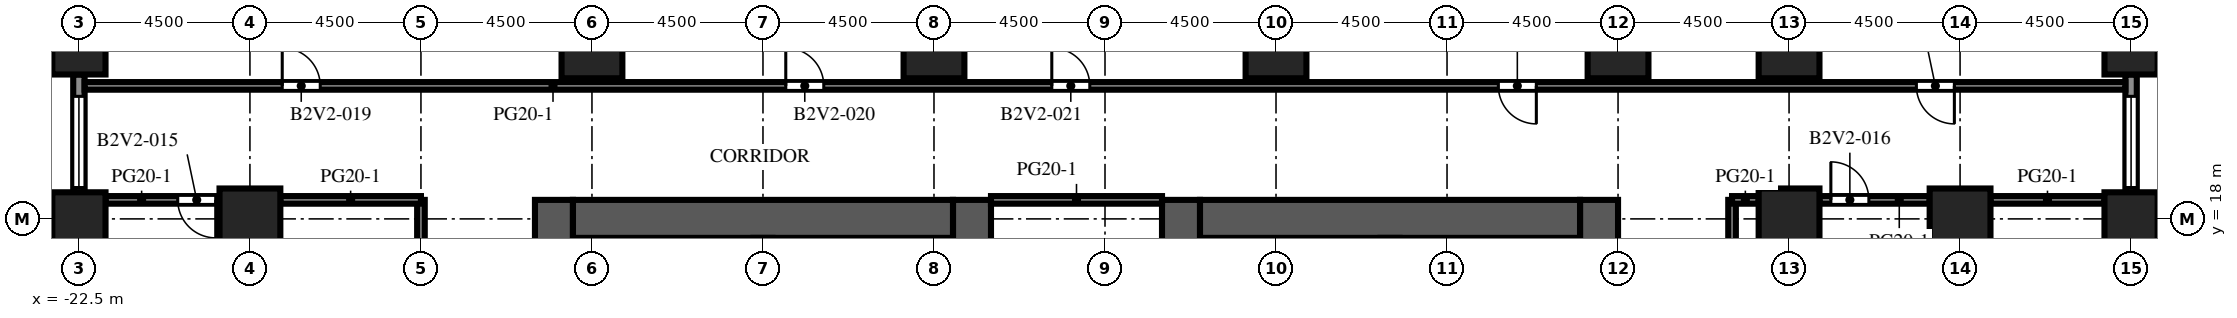
"""IFC4 building model, lengths in metres.
Left out: names, types, materials, properties, quantities, classifications, styles, units other than length and angle.
Written with IfcOpenShell. Run it as: python <this file> out.ifc"""

import sys

from ifc_helpers import new_model, si_unit, direction, frame, frame_2d, origin, origin_2d, place, context, subcontext, project, spatial, rectangle, extrude, element, fill, save


model = new_model("IFC4")
c1 = context("Model", 3, precision=1e-05, world=origin(), true_north=direction((0.0, 1.0)))
c2 = subcontext(c1, "Body", "Model", "MODEL_VIEW")
j1 = project(units=[si_unit("LENGTHUNIT", "METRE"), si_unit("PLANEANGLEUNIT", "RADIAN")], contexts=[c1])
p1 = place(None, origin())
s1 = spatial("IfcSite", under=j1, at=p1, CompositionType="ELEMENT")
p2 = place(p1, origin())
s2 = spatial("IfcBuilding", under=s1, at=p2, CompositionType="ELEMENT")
p3 = place(p2, frame((0.0, 0.0, 62.4)))
s3 = spatial("IfcBuildingStorey", under=s2, at=p3, CompositionType="ELEMENT", Elevation=62.4)
for number, where, z_axis, x_axis in (
    (1, (-22.5, 18.0, 0.0), (0.0, 0.0, 1.0), (1.0, 0.0, 0.0)),
    (2, (-22.5, 22.5, 0.0), (0.0, 0.0, 1.0), (1.0, 0.0, 0.0)),
    (3, (31.5, 18.0, 0.0), (0.0, 0.0, 1.0), (1.0, 0.0, 0.0)),
    (4, (31.5, 22.5, 0.0), (0.0, 0.0, 1.0), (1.0, 0.0, 0.0)),
):
    element("IfcColumn", number, at=place(p3, frame(where, z_axis=z_axis, x_axis=x_axis)), inside=s3, PredefinedType="COLUMN", context=c2, shape_type="SweptSolid", body=[
        extrude(rectangle(XDim=1.4, YDim=1.4, at=origin_2d()), origin(), (0.0, 0.0, 1.0), 4.1),
    ])
for number, where, z_axis, x_axis in (
    (5, (-18.0, 18.0, 0.0), (0.0, 0.0, 1.0), (1.0, 0.0, 0.0)),
    (6, (-9.0, 22.5, 0.0), (0.0, 0.0, 1.0), (1.0, 0.0, 0.0)),
    (7, (0.0, 22.5, 0.0), (0.0, 0.0, 1.0), (1.0, 0.0, 0.0)),
    (8, (9.0, 22.5, 0.0), (0.0, 0.0, 1.0), (1.0, 0.0, 0.0)),
    (9, (18.0, 22.5, 0.0), (0.0, 0.0, 1.0), (1.0, 0.0, 0.0)),
    (10, (22.5, 18.0, 0.0), (0.0, 0.0, 1.0), (1.0, 0.0, 0.0)),
    (11, (22.5, 22.5, 0.0), (0.0, 0.0, 1.0), (1.0, 0.0, 0.0)),
    (12, (27.0, 18.0, 0.0), (0.0, 0.0, 1.0), (1.0, 0.0, 0.0)),
):
    element("IfcColumn", number, at=place(p3, frame(where, z_axis=z_axis, x_axis=x_axis)), inside=s3, PredefinedType="COLUMN", context=c2, shape_type="SweptSolid", body=[
        extrude(rectangle(XDim=1.6, YDim=1.6, at=origin_2d()), origin(), (0.0, 0.0, 1.0), 4.1),
    ])
p4 = place(p3, frame((-10.0, -9.0, 0.0), z_axis=(0.0, 0.0, 1.0), x_axis=(0.0, 1.0, 0.0)))
e13 = element("IfcWall", 13, at=p4, inside=s3, PredefinedType="SHEAR", context=c2, shape_type="SweptSolid", body=[
    extrude(rectangle(XDim=27.5, YDim=1.0, at=frame_2d((13.75, 0.0))), origin(), (0.0, 0.0, 1.0), 4.1),
])
p5 = place(p4, frame((12.55, 0.0, 0.0)))
e14 = element("IfcOpeningElement", 14, at=p5, cuts=e13, PredefinedType="OPENING", context=c2, shape_type="SweptSolid", body=[
    extrude(rectangle(XDim=2.4, YDim=2.4, at=frame_2d((1.2, 1.2))), frame((0.0, 0.51, 0.0), z_axis=(0.0, -1.0, 0.0), x_axis=(1.0, 0.0, 0.0)), (0.0, 0.0, 1.0), 1.02),
])
p6 = place(p4, frame((6.825, 0.0, 0.0)))
e15 = element("IfcOpeningElement", 15, at=p6, cuts=e13, PredefinedType="OPENING", context=c2, shape_type="SweptSolid", body=[
    extrude(rectangle(XDim=1.2, YDim=2.1, at=frame_2d((0.6, 1.05))), frame((0.0, 0.51, 0.0), z_axis=(0.0, -1.0, 0.0), x_axis=(1.0, 0.0, 0.0)), (0.0, 0.0, 1.0), 1.02),
])
p7 = place(p4, frame((19.475, 0.0, 0.0)))
e16 = element("IfcOpeningElement", 16, at=p7, cuts=e13, PredefinedType="OPENING", context=c2, shape_type="SweptSolid", body=[
    extrude(rectangle(XDim=1.2, YDim=2.1, at=frame_2d((0.6, 1.05))), frame((0.0, 0.51, 0.0), z_axis=(0.0, -1.0, 0.0), x_axis=(1.0, 0.0, 0.0)), (0.0, 0.0, 1.0), 1.02),
])
p8 = place(p3, frame((1.0, -9.0, 0.0), z_axis=(0.0, 0.0, 1.0), x_axis=(0.0, 1.0, 0.0)))
e17 = element("IfcWall", 17, at=p8, inside=s3, PredefinedType="SHEAR", context=c2, shape_type="SweptSolid", body=[
    extrude(rectangle(XDim=27.5, YDim=1.0, at=frame_2d((13.75, 0.0))), origin(), (0.0, 0.0, 1.0), 4.1),
])
p9 = place(p8, frame((12.55, 0.0, 0.0)))
e18 = element("IfcOpeningElement", 18, at=p9, cuts=e17, PredefinedType="OPENING", context=c2, shape_type="SweptSolid", body=[
    extrude(rectangle(XDim=2.4, YDim=2.4, at=frame_2d((1.2, 1.2))), frame((0.0, 0.51, 0.0), z_axis=(0.0, -1.0, 0.0), x_axis=(1.0, 0.0, 0.0)), (0.0, 0.0, 1.0), 1.02),
])
p10 = place(p8, frame((5.55, 0.0, 0.0)))
e19 = element("IfcOpeningElement", 19, at=p10, cuts=e17, PredefinedType="OPENING", context=c2, shape_type="SweptSolid", body=[
    extrude(rectangle(XDim=0.905, YDim=2.1, at=frame_2d((0.453, 1.05))), frame((0.0, 0.51, 0.0), z_axis=(0.0, -1.0, 0.0), x_axis=(1.0, 0.0, 0.0)), (0.0, 0.0, 1.0), 1.02),
])
p11 = place(p8, frame((23.363, 0.0, 0.0)))
e20 = element("IfcOpeningElement", 20, at=p11, cuts=e17, PredefinedType="OPENING", context=c2, shape_type="SweptSolid", body=[
    extrude(rectangle(XDim=1.2, YDim=2.1, at=frame_2d((0.6, 1.05))), frame((0.0, 0.51, 0.0), z_axis=(0.0, -1.0, 0.0), x_axis=(1.0, 0.0, 0.0)), (0.0, 0.0, 1.0), 1.02),
])
p12 = place(p3, frame((-9.5, 18.0, 0.0), z_axis=(0.0, 0.0, 1.0), x_axis=(1.0, 0.0, 0.0)))
e21 = element("IfcWall", 21, at=p12, inside=s3, PredefinedType="SHEAR", context=c2, shape_type="SweptSolid", body=[
    extrude(rectangle(XDim=10.0, YDim=1.0, at=frame_2d((5.0, 0.0))), origin(), (0.0, 0.0, 1.0), 4.1),
])
p13 = place(p3, frame((6.5, -9.0, 0.0), z_axis=(0.0, 0.0, 1.0), x_axis=(0.0, 1.0, 0.0)))
e22 = element("IfcWall", 22, at=p13, inside=s3, PredefinedType="SHEAR", context=c2, shape_type="SweptSolid", body=[
    extrude(rectangle(XDim=27.5, YDim=1.0, at=frame_2d((13.75, 0.0))), origin(), (0.0, 0.0, 1.0), 4.1),
])
p14 = place(p13, frame((12.55, 0.0, 0.0)))
e23 = element("IfcOpeningElement", 23, at=p14, cuts=e22, PredefinedType="OPENING", context=c2, shape_type="SweptSolid", body=[
    extrude(rectangle(XDim=2.4, YDim=2.4, at=frame_2d((1.2, 1.2))), frame((0.0, 0.51, 0.0), z_axis=(0.0, -1.0, 0.0), x_axis=(1.0, 0.0, 0.0)), (0.0, 0.0, 1.0), 1.02),
])
p15 = place(p13, frame((5.55, 0.0, 0.0)))
e24 = element("IfcOpeningElement", 24, at=p15, cuts=e22, PredefinedType="OPENING", context=c2, shape_type="SweptSolid", body=[
    extrude(rectangle(XDim=0.905, YDim=2.1, at=frame_2d((0.453, 1.05))), frame((0.0, 0.51, 0.0), z_axis=(0.0, -1.0, 0.0), x_axis=(1.0, 0.0, 0.0)), (0.0, 0.0, 1.0), 1.02),
])
p16 = place(p13, frame((23.363, 0.0, 0.0)))
e25 = element("IfcOpeningElement", 25, at=p16, cuts=e22, PredefinedType="OPENING", context=c2, shape_type="SweptSolid", body=[
    extrude(rectangle(XDim=1.2, YDim=2.1, at=frame_2d((0.6, 1.05))), frame((0.0, 0.51, 0.0), z_axis=(0.0, -1.0, 0.0), x_axis=(1.0, 0.0, 0.0)), (0.0, 0.0, 1.0), 1.02),
])
p17 = place(p3, frame((17.5, -9.0, 0.0), z_axis=(0.0, 0.0, 1.0), x_axis=(0.0, 1.0, 0.0)))
e26 = element("IfcWall", 26, at=p17, inside=s3, PredefinedType="SHEAR", context=c2, shape_type="SweptSolid", body=[
    extrude(rectangle(XDim=27.5, YDim=1.0, at=frame_2d((13.75, 0.0))), origin(), (0.0, 0.0, 1.0), 4.1),
])
p18 = place(p17, frame((12.55, 0.0, 0.0)))
e27 = element("IfcOpeningElement", 27, at=p18, cuts=e26, PredefinedType="OPENING", context=c2, shape_type="SweptSolid", body=[
    extrude(rectangle(XDim=2.4, YDim=2.4, at=frame_2d((1.2, 1.2))), frame((0.0, 0.51, 0.0), z_axis=(0.0, -1.0, 0.0), x_axis=(1.0, 0.0, 0.0)), (0.0, 0.0, 1.0), 1.02),
])
p19 = place(p17, frame((6.825, 0.0, 0.0)))
e28 = element("IfcOpeningElement", 28, at=p19, cuts=e26, PredefinedType="OPENING", context=c2, shape_type="SweptSolid", body=[
    extrude(rectangle(XDim=1.2, YDim=2.1, at=frame_2d((0.6, 1.05))), frame((0.0, 0.51, 0.0), z_axis=(0.0, -1.0, 0.0), x_axis=(1.0, 0.0, 0.0)), (0.0, 0.0, 1.0), 1.02),
])
p20 = place(p17, frame((19.475, 0.0, 0.0)))
e29 = element("IfcOpeningElement", 29, at=p20, cuts=e26, PredefinedType="OPENING", context=c2, shape_type="SweptSolid", body=[
    extrude(rectangle(XDim=1.2, YDim=2.1, at=frame_2d((0.6, 1.05))), frame((0.0, 0.51, 0.0), z_axis=(0.0, -1.0, 0.0), x_axis=(1.0, 0.0, 0.0)), (0.0, 0.0, 1.0), 1.02),
])
p21 = place(p3, frame((7.0, 18.0, 0.0), z_axis=(0.0, 0.0, 1.0), x_axis=(1.0, 0.0, 0.0)))
e30 = element("IfcWall", 30, at=p21, inside=s3, PredefinedType="SHEAR", context=c2, shape_type="SweptSolid", body=[
    extrude(rectangle(XDim=10.0, YDim=1.0, at=frame_2d((5.0, 0.0))), origin(), (0.0, 0.0, 1.0), 4.1),
])
p22 = place(p3, frame((31.5, 21.8, 0.0), z_axis=(0.0, 0.0, 1.0), x_axis=(0.0, -1.0, 0.0)))
e31 = element("IfcWall", 31, at=p22, inside=s3, PredefinedType="SOLIDWALL", context=c2, shape_type="SweptSolid", body=[
    extrude(rectangle(XDim=3.1, YDim=0.3, at=frame_2d((1.55, 0.0))), origin(), (0.0, 0.0, 1.0), 2.75),
])
p23 = place(p22, frame((0.575, 0.0, 0.8)))
e32 = element("IfcOpeningElement", 32, at=p23, cuts=e31, PredefinedType="OPENING", context=c2, shape_type="SweptSolid", body=[
    extrude(rectangle(XDim=2.4, YDim=1.7, at=frame_2d((1.2, 0.85))), frame((0.0, 0.16, 0.0), z_axis=(0.0, -1.0, 0.0), x_axis=(1.0, 0.0, 0.0)), (0.0, 0.0, 1.0), 0.32),
])
p24 = place(p3, frame((-22.5, 18.7, 0.0), z_axis=(0.0, 0.0, 1.0), x_axis=(0.0, 1.0, 0.0)))
e33 = element("IfcWall", 33, at=p24, inside=s3, PredefinedType="SOLIDWALL", context=c2, shape_type="SweptSolid", body=[
    extrude(rectangle(XDim=3.1, YDim=0.3, at=frame_2d((1.55, 0.0))), origin(), (0.0, 0.0, 1.0), 2.75),
])
p25 = place(p24, frame((0.125, 0.0, 0.8)))
e34 = element("IfcOpeningElement", 34, at=p25, cuts=e33, PredefinedType="OPENING", context=c2, shape_type="SweptSolid", body=[
    extrude(rectangle(XDim=2.4, YDim=1.7, at=frame_2d((1.2, 0.85))), frame((0.0, 0.16, 0.0), z_axis=(0.0, -1.0, 0.0), x_axis=(1.0, 0.0, 0.0)), (0.0, 0.0, 1.0), 0.32),
])
p26 = place(p3, frame((-13.5, -9.0, 0.0), z_axis=(0.0, 0.0, 1.0), x_axis=(0.0, 1.0, 0.0)))
e35 = element("IfcWall", 35, at=p26, inside=s3, PredefinedType="PARTITIONING", context=c2, shape_type="SweptSolid", body=[
    extrude(rectangle(XDim=27.5, YDim=0.2, at=frame_2d((13.75, 0.0))), origin(), (0.0, 0.0, 1.0), 3.65),
])
p27 = place(p26, frame((4.85, 0.0, 0.0)))
e36 = element("IfcOpeningElement", 36, at=p27, cuts=e35, PredefinedType="OPENING", context=c2, shape_type="SweptSolid", body=[
    extrude(rectangle(XDim=1.0, YDim=2.1, at=frame_2d((0.5, 1.05))), frame((0.0, 0.11, 0.0), z_axis=(0.0, -1.0, 0.0), x_axis=(1.0, 0.0, 0.0)), (0.0, 0.0, 1.0), 0.22),
])
p28 = place(p26, frame((16.35, 0.0, 0.0)))
e37 = element("IfcOpeningElement", 37, at=p28, cuts=e35, PredefinedType="OPENING", context=c2, shape_type="SweptSolid", body=[
    extrude(rectangle(XDim=1.0, YDim=2.1, at=frame_2d((0.5, 1.05))), frame((0.0, 0.11, 0.0), z_axis=(0.0, -1.0, 0.0), x_axis=(1.0, 0.0, 0.0)), (0.0, 0.0, 1.0), 0.22),
])
p29 = place(p3, frame((21.0, 18.5, 0.0), z_axis=(0.0, 0.0, 1.0), x_axis=(0.0, -1.0, 0.0)))
e38 = element("IfcWall", 38, at=p29, inside=s3, PredefinedType="PARTITIONING", context=c2, shape_type="SweptSolid", body=[
    extrude(rectangle(XDim=27.5, YDim=0.2, at=frame_2d((13.75, 0.0))), origin(), (0.0, 0.0, 1.0), 3.65),
])
p30 = place(p29, frame((19.4, 0.0, 0.0)))
e39 = element("IfcOpeningElement", 39, at=p30, cuts=e38, PredefinedType="OPENING", context=c2, shape_type="SweptSolid", body=[
    extrude(rectangle(XDim=1.0, YDim=2.1, at=frame_2d((0.5, 1.05))), frame((0.0, 0.11, 0.0), z_axis=(0.0, -1.0, 0.0), x_axis=(1.0, 0.0, 0.0)), (0.0, 0.0, 1.0), 0.22),
])
p31 = place(p29, frame((7.65, 0.0, 0.0)))
e40 = element("IfcOpeningElement", 40, at=p31, cuts=e38, PredefinedType="OPENING", context=c2, shape_type="SweptSolid", body=[
    extrude(rectangle(XDim=1.0, YDim=2.1, at=frame_2d((0.5, 1.05))), frame((0.0, 0.11, 0.0), z_axis=(0.0, -1.0, 0.0), x_axis=(1.0, 0.0, 0.0)), (0.0, 0.0, 1.0), 0.22),
])
p32 = place(p3, frame((-18.8, 18.5, 0.0), z_axis=(0.0, 0.0, 1.0), x_axis=(-1.0, 0.0, 0.0)))
e41 = element("IfcWall", 41, at=p32, inside=s3, PredefinedType="PARTITIONING", context=c2, shape_type="SweptSolid", body=[
    extrude(rectangle(XDim=3.0, YDim=0.2, at=frame_2d((1.5, 0.0))), origin(), (0.0, 0.0, 1.0), 3.65),
])
p33 = place(p32, frame((0.1, 0.0, 0.0)))
e42 = element("IfcOpeningElement", 42, at=p33, cuts=e41, PredefinedType="OPENING", context=c2, shape_type="SweptSolid", body=[
    extrude(rectangle(XDim=1.0, YDim=2.1, at=frame_2d((0.5, 1.05))), frame((0.0, 0.11, 0.0), z_axis=(0.0, -1.0, 0.0), x_axis=(1.0, 0.0, 0.0)), (0.0, 0.0, 1.0), 0.22),
])
p34 = place(p3, frame((-17.2, 18.5, 0.0), z_axis=(0.0, 0.0, 1.0), x_axis=(1.0, 0.0, 0.0)))
e43 = element("IfcWall", 43, at=p34, inside=s3, PredefinedType="PARTITIONING", context=c2, shape_type="SweptSolid", body=[
    extrude(rectangle(XDim=3.7, YDim=0.2, at=frame_2d((1.85, 0.0))), origin(), (0.0, 0.0, 1.0), 3.65),
])
p35 = place(p3, frame((1.5, 18.5, 0.0), z_axis=(0.0, 0.0, 1.0), x_axis=(1.0, 0.0, 0.0)))
e44 = element("IfcWall", 44, at=p35, inside=s3, PredefinedType="PARTITIONING", context=c2, shape_type="SweptSolid", body=[
    extrude(rectangle(XDim=4.5, YDim=0.2, at=frame_2d((2.25, 0.0))), origin(), (0.0, 0.0, 1.0), 3.65),
])
p36 = place(p3, frame((21.0, 18.5, 0.0), z_axis=(0.0, 0.0, 1.0), x_axis=(1.0, 0.0, 0.0)))
e45 = element("IfcWall", 45, at=p36, inside=s3, PredefinedType="PARTITIONING", context=c2, shape_type="SweptSolid", body=[
    extrude(rectangle(XDim=0.7, YDim=0.2, at=frame_2d((0.35, 0.0))), origin(), (0.0, 0.0, 1.0), 3.65),
])
p37 = place(p3, frame((26.2, 18.5, 0.0), z_axis=(0.0, 0.0, 1.0), x_axis=(-1.0, 0.0, 0.0)))
e46 = element("IfcWall", 46, at=p37, inside=s3, PredefinedType="PARTITIONING", context=c2, shape_type="SweptSolid", body=[
    extrude(rectangle(XDim=2.9, YDim=0.2, at=frame_2d((1.45, 0.0))), origin(), (0.0, 0.0, 1.0), 3.65),
])
p38 = place(p37, frame((1.6, 0.0, 0.0)))
e47 = element("IfcOpeningElement", 47, at=p38, cuts=e46, PredefinedType="OPENING", context=c2, shape_type="SweptSolid", body=[
    extrude(rectangle(XDim=1.0, YDim=2.1, at=frame_2d((0.5, 1.05))), frame((0.0, 0.11, 0.0), z_axis=(0.0, -1.0, 0.0), x_axis=(1.0, 0.0, 0.0)), (0.0, 0.0, 1.0), 0.22),
])
p39 = place(p3, frame((27.8, 18.5, 0.0), z_axis=(0.0, 0.0, 1.0), x_axis=(1.0, 0.0, 0.0)))
e48 = element("IfcWall", 48, at=p39, inside=s3, PredefinedType="PARTITIONING", context=c2, shape_type="SweptSolid", body=[
    extrude(rectangle(XDim=3.0, YDim=0.2, at=frame_2d((1.5, 0.0))), origin(), (0.0, 0.0, 1.0), 3.65),
])
p40 = place(p3, frame((-22.35, 21.5, 0.0), z_axis=(0.0, 0.0, 1.0), x_axis=(1.0, 0.0, 0.0)))
e49 = element("IfcWall", 49, at=p40, inside=s3, PredefinedType="PARTITIONING", context=c2, shape_type="SweptSolid", body=[
    extrude(rectangle(XDim=53.7, YDim=0.2, at=frame_2d((26.85, 0.0))), origin(), (0.0, 0.0, 1.0), 3.65),
])
p41 = place(p40, frame((5.2, 0.0, 0.0)))
e50 = element("IfcOpeningElement", 50, at=p41, cuts=e49, PredefinedType="OPENING", context=c2, shape_type="SweptSolid", body=[
    extrude(rectangle(XDim=1.0, YDim=2.1, at=frame_2d((0.5, 1.05))), frame((0.0, 0.11, 0.0), z_axis=(0.0, -1.0, 0.0), x_axis=(1.0, 0.0, 0.0)), (0.0, 0.0, 1.0), 0.22),
])
p42 = place(p40, frame((18.45, 0.0, 0.0)))
e51 = element("IfcOpeningElement", 51, at=p42, cuts=e49, PredefinedType="OPENING", context=c2, shape_type="SweptSolid", body=[
    extrude(rectangle(XDim=1.0, YDim=2.1, at=frame_2d((0.5, 1.05))), frame((0.0, 0.11, 0.0), z_axis=(0.0, -1.0, 0.0), x_axis=(1.0, 0.0, 0.0)), (0.0, 0.0, 1.0), 0.22),
])
p43 = place(p40, frame((25.45, 0.0, 0.0)))
e52 = element("IfcOpeningElement", 52, at=p43, cuts=e49, PredefinedType="OPENING", context=c2, shape_type="SweptSolid", body=[
    extrude(rectangle(XDim=1.0, YDim=2.1, at=frame_2d((0.5, 1.05))), frame((0.0, 0.11, 0.0), z_axis=(0.0, -1.0, 0.0), x_axis=(1.0, 0.0, 0.0)), (0.0, 0.0, 1.0), 0.22),
])
p44 = place(p40, frame((37.2, 0.0, 0.0)))
e53 = element("IfcOpeningElement", 53, at=p44, cuts=e49, PredefinedType="OPENING", context=c2, shape_type="SweptSolid", body=[
    extrude(rectangle(XDim=1.0, YDim=2.1, at=frame_2d((0.5, 1.05))), frame((0.0, 0.11, 0.0), z_axis=(0.0, -1.0, 0.0), x_axis=(1.0, 0.0, 0.0)), (0.0, 0.0, 1.0), 0.22),
])
p45 = place(p40, frame((48.2, 0.0, 0.0)))
e54 = element("IfcOpeningElement", 54, at=p45, cuts=e49, PredefinedType="OPENING", context=c2, shape_type="SweptSolid", body=[
    extrude(rectangle(XDim=1.0, YDim=2.1, at=frame_2d((0.5, 1.05))), frame((0.0, 0.11, 0.0), z_axis=(0.0, -1.0, 0.0), x_axis=(1.0, 0.0, 0.0)), (0.0, 0.0, 1.0), 0.22),
])
p46 = place(p23, origin())
e55 = element("IfcWindow", 55, at=p46, inside=s3, PartitioningType="SINGLE_PANEL", PredefinedType="WINDOW", context=c2, shape_type="SweptSolid", body=[
    extrude(rectangle(XDim=2.4, YDim=1.7, at=frame_2d((1.2, 0.85))), frame((0.0, 0.03, 0.0), z_axis=(0.0, -1.0, 0.0), x_axis=(1.0, 0.0, 0.0)), (0.0, 0.0, 1.0), 0.06),
])
fill(e32, e55)
p47 = place(p25, origin())
e56 = element("IfcWindow", 56, at=p47, inside=s3, PartitioningType="SINGLE_PANEL", PredefinedType="WINDOW", context=c2, shape_type="SweptSolid", body=[
    extrude(rectangle(XDim=2.4, YDim=1.7, at=frame_2d((1.2, 0.85))), frame((0.0, 0.03, 0.0), z_axis=(0.0, -1.0, 0.0), x_axis=(1.0, 0.0, 0.0)), (0.0, 0.0, 1.0), 0.06),
])
fill(e34, e56)
p48 = place(p33, origin())
e57 = element("IfcDoor", 57, at=p48, inside=s3, OperationType="SINGLE_SWING_LEFT", PredefinedType="DOOR", context=c2, shape_type="SweptSolid", body=[
    extrude(rectangle(XDim=1.0, YDim=2.1, at=frame_2d((0.5, 1.05))), frame((0.0, 0.025, 0.0), z_axis=(0.0, -1.0, 0.0), x_axis=(1.0, 0.0, 0.0)), (0.0, 0.0, 1.0), 0.05),
])
fill(e42, e57)
p49 = place(p38, origin())
e58 = element("IfcDoor", 58, at=p49, inside=s3, OperationType="SINGLE_SWING_RIGHT", PredefinedType="DOOR", context=c2, shape_type="SweptSolid", body=[
    extrude(rectangle(XDim=1.0, YDim=2.1, at=frame_2d((0.5, 1.05))), frame((0.0, 0.025, 0.0), z_axis=(0.0, -1.0, 0.0), x_axis=(1.0, 0.0, 0.0)), (0.0, 0.0, 1.0), 0.05),
])
fill(e47, e58)
p50 = place(p41, origin())
e59 = element("IfcDoor", 59, at=p50, inside=s3, OperationType="SINGLE_SWING_LEFT", PredefinedType="DOOR", context=c2, shape_type="SweptSolid", body=[
    extrude(rectangle(XDim=1.0, YDim=2.1, at=frame_2d((0.5, 1.05))), frame((0.0, 0.025, 0.0), z_axis=(0.0, -1.0, 0.0), x_axis=(1.0, 0.0, 0.0)), (0.0, 0.0, 1.0), 0.05),
])
fill(e50, e59)
p51 = place(p42, origin())
e60 = element("IfcDoor", 60, at=p51, inside=s3, OperationType="SINGLE_SWING_LEFT", PredefinedType="DOOR", context=c2, shape_type="SweptSolid", body=[
    extrude(rectangle(XDim=1.0, YDim=2.1, at=frame_2d((0.5, 1.05))), frame((0.0, 0.025, 0.0), z_axis=(0.0, -1.0, 0.0), x_axis=(1.0, 0.0, 0.0)), (0.0, 0.0, 1.0), 0.05),
])
fill(e51, e60)
p52 = place(p43, origin())
e61 = element("IfcDoor", 61, at=p52, inside=s3, OperationType="SINGLE_SWING_LEFT", PredefinedType="DOOR", context=c2, shape_type="SweptSolid", body=[
    extrude(rectangle(XDim=1.0, YDim=2.1, at=frame_2d((0.5, 1.05))), frame((0.0, 0.025, 0.0), z_axis=(0.0, -1.0, 0.0), x_axis=(1.0, 0.0, 0.0)), (0.0, 0.0, 1.0), 0.05),
])
fill(e52, e61)
p53 = place(p44, origin())
e62 = element("IfcDoor", 62, at=p53, inside=s3, OperationType="SINGLE_SWING_RIGHT", PredefinedType="DOOR", context=c2, shape_type="SweptSolid", body=[
    extrude(rectangle(XDim=1.0, YDim=2.1, at=frame_2d((0.5, 1.05))), frame((0.0, 0.025, 0.0), z_axis=(0.0, -1.0, 0.0), x_axis=(1.0, 0.0, 0.0)), (0.0, 0.0, 1.0), 0.05),
])
fill(e53, e62)
p54 = place(p45, origin())
e63 = element("IfcDoor", 63, at=p54, inside=s3, OperationType="SINGLE_SWING_RIGHT", PredefinedType="DOOR", context=c2, shape_type="SweptSolid", body=[
    extrude(rectangle(XDim=1.0, YDim=2.1, at=frame_2d((0.5, 1.05))), frame((0.0, 0.025, 0.0), z_axis=(0.0, -1.0, 0.0), x_axis=(1.0, 0.0, 0.0)), (0.0, 0.0, 1.0), 0.05),
])
fill(e54, e63)
save(model, sys.argv[1])
